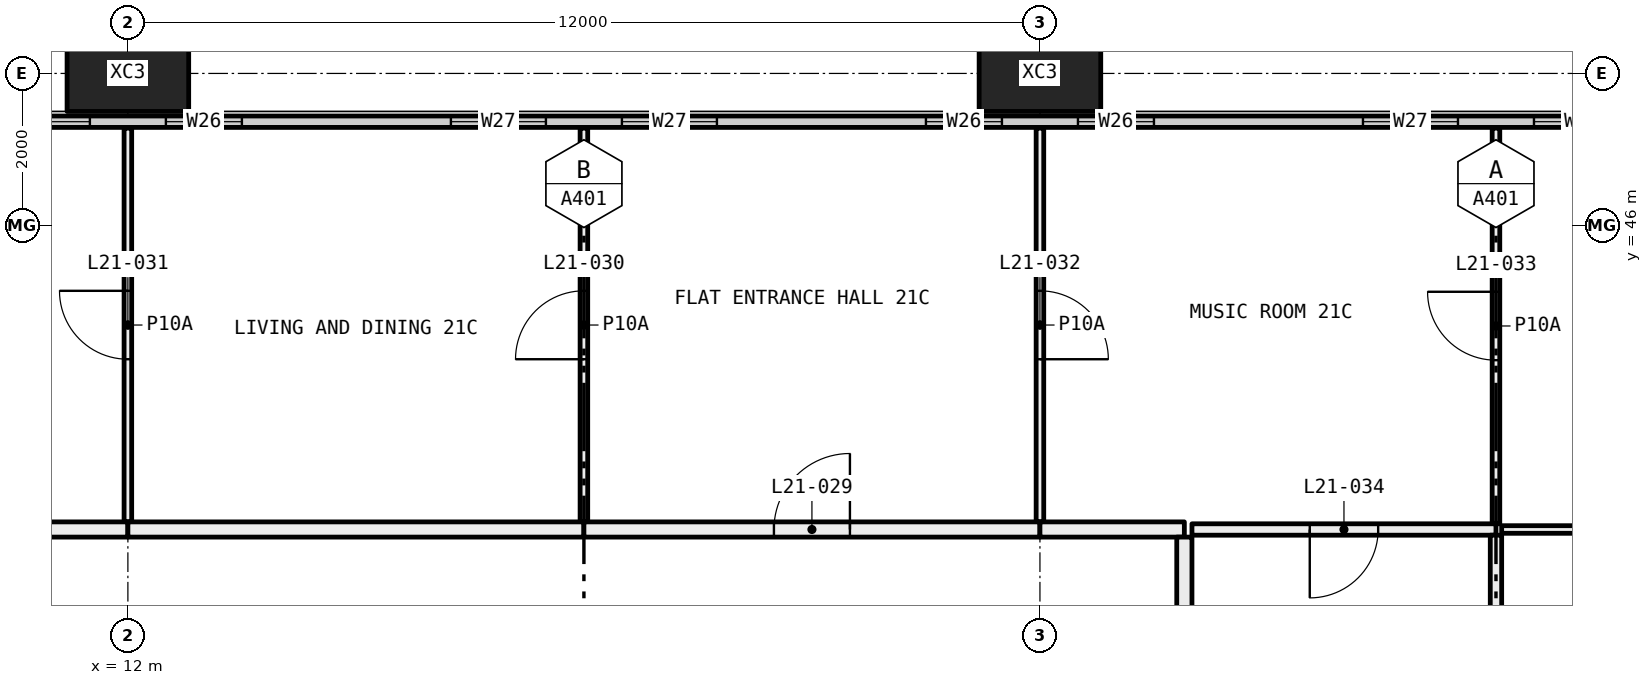
"""IFC4 building model, lengths in metres.
Left out: names, types, materials, properties, quantities, classifications, styles, units other than length and angle.
Written with IfcOpenShell. Run it as: python <this file> out.ifc"""

import sys

from ifc_helpers import new_model, si_unit, direction, frame, frame_2d, origin, origin_2d, place, context, subcontext, project, spatial, rectangle, hollow_rectangle, extrude, element, fill, save


model = new_model("IFC4")
c1 = context("Model", 3, precision=1e-05, world=origin(), true_north=direction((0.0, 1.0)))
c2 = subcontext(c1, "Body", "Model", "MODEL_VIEW")
j1 = project(units=[si_unit("LENGTHUNIT", "METRE"), si_unit("PLANEANGLEUNIT", "RADIAN")], contexts=[c1])
p1 = place(None, origin())
s1 = spatial("IfcSite", under=j1, at=p1, CompositionType="ELEMENT")
p2 = place(p1, origin())
s2 = spatial("IfcBuilding", under=s1, at=p2, CompositionType="ELEMENT")
p3 = place(p2, frame((0.0, 0.0, 85.2)))
s3 = spatial("IfcBuildingStorey", under=s2, at=p3, CompositionType="ELEMENT", Elevation=85.2)
for number, where, z_axis, x_axis in (
    (1, (12.0, 48.0, -0.4), (0.0, 0.0, 1.0), (1.0, 0.0, 0.0)),
    (2, (24.0, 48.0, -0.4), (0.0, 0.0, 1.0), (1.0, 0.0, 0.0)),
):
    element("IfcColumn", number, at=place(p3, frame(where, z_axis=z_axis, x_axis=x_axis)), inside=s3, PredefinedType="COLUMN", context=c2, shape_type="SweptSolid", body=[
        extrude(hollow_rectangle(XDim=1.6, YDim=1.0, WallThickness=0.065, at=origin_2d()), origin(), (0.0, 0.0, 1.0), 3.45),
    ])
p4 = place(p3, frame((6.56, 47.365, 0.0), z_axis=(0.0, 0.0, 1.0), x_axis=(1.0, 0.0, 0.0)))
e3 = element("IfcWall", 3, at=p4, inside=s3, PredefinedType="ELEMENTEDWALL", context=c2, shape_type="SweptSolid", body=[
    extrude(rectangle(XDim=58.88, YDim=0.15, at=frame_2d((29.44, 0.0))), origin(), (0.0, 0.0, 1.0), 3.05),
])
p5 = place(p4, frame((0.44, 0.0, 0.45)))
e4 = element("IfcOpeningElement", 4, at=p5, cuts=e3, PredefinedType="OPENING", context=c2, shape_type="SweptSolid", body=[
    extrude(rectangle(XDim=4.5, YDim=2.55, at=frame_2d((2.25, 1.275))), frame((0.0, 0.085, 0.0), z_axis=(0.0, -1.0, 0.0), x_axis=(1.0, 0.0, 0.0)), (0.0, 0.0, 1.0), 0.17),
])
p6 = place(p4, frame((5.94, 0.0, 0.45)))
e5 = element("IfcOpeningElement", 5, at=p6, cuts=e3, PredefinedType="OPENING", context=c2, shape_type="SweptSolid", body=[
    extrude(rectangle(XDim=1.0, YDim=2.55, at=frame_2d((0.5, 1.275))), frame((0.0, 0.085, 0.0), z_axis=(0.0, -1.0, 0.0), x_axis=(1.0, 0.0, 0.0)), (0.0, 0.0, 1.0), 0.17),
])
p7 = place(p4, frame((9.69, 0.0, 0.45)))
e6 = element("IfcOpeningElement", 6, at=p7, cuts=e3, PredefinedType="OPENING", context=c2, shape_type="SweptSolid", body=[
    extrude(rectangle(XDim=1.25, YDim=2.55, at=frame_2d((0.625, 1.275))), frame((0.0, 0.085, 0.0), z_axis=(0.0, -1.0, 0.0), x_axis=(1.0, 0.0, 0.0)), (0.0, 0.0, 1.0), 0.17),
])
p8 = place(p4, frame((11.94, 0.0, 0.45)))
e7 = element("IfcOpeningElement", 7, at=p8, cuts=e3, PredefinedType="OPENING", context=c2, shape_type="SweptSolid", body=[
    extrude(rectangle(XDim=1.25, YDim=2.55, at=frame_2d((0.625, 1.275))), frame((0.0, 0.085, 0.0), z_axis=(0.0, -1.0, 0.0), x_axis=(1.0, 0.0, 0.0)), (0.0, 0.0, 1.0), 0.17),
])
p9 = place(p4, frame((15.94, 0.0, 0.45)))
e8 = element("IfcOpeningElement", 8, at=p9, cuts=e3, PredefinedType="OPENING", context=c2, shape_type="SweptSolid", body=[
    extrude(rectangle(XDim=1.0, YDim=2.55, at=frame_2d((0.5, 1.275))), frame((0.0, 0.085, 0.0), z_axis=(0.0, -1.0, 0.0), x_axis=(1.0, 0.0, 0.0)), (0.0, 0.0, 1.0), 0.17),
])
p10 = place(p4, frame((17.94, 0.0, 0.45)))
e9 = element("IfcOpeningElement", 9, at=p10, cuts=e3, PredefinedType="OPENING", context=c2, shape_type="SweptSolid", body=[
    extrude(rectangle(XDim=1.0, YDim=2.55, at=frame_2d((0.5, 1.275))), frame((0.0, 0.085, 0.0), z_axis=(0.0, -1.0, 0.0), x_axis=(1.0, 0.0, 0.0)), (0.0, 0.0, 1.0), 0.17),
])
p11 = place(p4, frame((21.69, 0.0, 0.45)))
e10 = element("IfcOpeningElement", 10, at=p11, cuts=e3, PredefinedType="OPENING", context=c2, shape_type="SweptSolid", body=[
    extrude(rectangle(XDim=1.25, YDim=2.55, at=frame_2d((0.625, 1.275))), frame((0.0, 0.085, 0.0), z_axis=(0.0, -1.0, 0.0), x_axis=(1.0, 0.0, 0.0)), (0.0, 0.0, 1.0), 0.17),
])
p12 = place(p4, frame((23.94, 0.0, 0.45)))
e11 = element("IfcOpeningElement", 11, at=p12, cuts=e3, PredefinedType="OPENING", context=c2, shape_type="SweptSolid", body=[
    extrude(rectangle(XDim=1.25, YDim=2.55, at=frame_2d((0.625, 1.275))), frame((0.0, 0.085, 0.0), z_axis=(0.0, -1.0, 0.0), x_axis=(1.0, 0.0, 0.0)), (0.0, 0.0, 1.0), 0.17),
])
p13 = place(p4, frame((27.94, 0.0, 0.45)))
e12 = element("IfcOpeningElement", 12, at=p13, cuts=e3, PredefinedType="OPENING", context=c2, shape_type="SweptSolid", body=[
    extrude(rectangle(XDim=1.0, YDim=2.55, at=frame_2d((0.5, 1.275))), frame((0.0, 0.085, 0.0), z_axis=(0.0, -1.0, 0.0), x_axis=(1.0, 0.0, 0.0)), (0.0, 0.0, 1.0), 0.17),
])
p14 = place(p4, frame((29.94, 0.0, 0.45)))
e13 = element("IfcOpeningElement", 13, at=p14, cuts=e3, PredefinedType="OPENING", context=c2, shape_type="SweptSolid", body=[
    extrude(rectangle(XDim=1.0, YDim=2.55, at=frame_2d((0.5, 1.275))), frame((0.0, 0.085, 0.0), z_axis=(0.0, -1.0, 0.0), x_axis=(1.0, 0.0, 0.0)), (0.0, 0.0, 1.0), 0.17),
])
p15 = place(p4, frame((33.69, 0.0, 0.45)))
e14 = element("IfcOpeningElement", 14, at=p15, cuts=e3, PredefinedType="OPENING", context=c2, shape_type="SweptSolid", body=[
    extrude(rectangle(XDim=1.25, YDim=2.55, at=frame_2d((0.625, 1.275))), frame((0.0, 0.085, 0.0), z_axis=(0.0, -1.0, 0.0), x_axis=(1.0, 0.0, 0.0)), (0.0, 0.0, 1.0), 0.17),
])
p16 = place(p4, frame((35.94, 0.0, 0.45)))
e15 = element("IfcOpeningElement", 15, at=p16, cuts=e3, PredefinedType="OPENING", context=c2, shape_type="SweptSolid", body=[
    extrude(rectangle(XDim=1.25, YDim=2.55, at=frame_2d((0.625, 1.275))), frame((0.0, 0.085, 0.0), z_axis=(0.0, -1.0, 0.0), x_axis=(1.0, 0.0, 0.0)), (0.0, 0.0, 1.0), 0.17),
])
p17 = place(p4, frame((39.94, 0.0, 0.45)))
e16 = element("IfcOpeningElement", 16, at=p17, cuts=e3, PredefinedType="OPENING", context=c2, shape_type="SweptSolid", body=[
    extrude(rectangle(XDim=1.0, YDim=2.55, at=frame_2d((0.5, 1.275))), frame((0.0, 0.085, 0.0), z_axis=(0.0, -1.0, 0.0), x_axis=(1.0, 0.0, 0.0)), (0.0, 0.0, 1.0), 0.17),
])
p18 = place(p4, frame((41.94, 0.0, 0.45)))
e17 = element("IfcOpeningElement", 17, at=p18, cuts=e3, PredefinedType="OPENING", context=c2, shape_type="SweptSolid", body=[
    extrude(rectangle(XDim=1.0, YDim=2.55, at=frame_2d((0.5, 1.275))), frame((0.0, 0.085, 0.0), z_axis=(0.0, -1.0, 0.0), x_axis=(1.0, 0.0, 0.0)), (0.0, 0.0, 1.0), 0.17),
])
p19 = place(p4, frame((45.69, 0.0, 0.45)))
e18 = element("IfcOpeningElement", 18, at=p19, cuts=e3, PredefinedType="OPENING", context=c2, shape_type="SweptSolid", body=[
    extrude(rectangle(XDim=1.25, YDim=2.55, at=frame_2d((0.625, 1.275))), frame((0.0, 0.085, 0.0), z_axis=(0.0, -1.0, 0.0), x_axis=(1.0, 0.0, 0.0)), (0.0, 0.0, 1.0), 0.17),
])
p20 = place(p4, frame((47.94, 0.0, 0.45)))
e19 = element("IfcOpeningElement", 19, at=p20, cuts=e3, PredefinedType="OPENING", context=c2, shape_type="SweptSolid", body=[
    extrude(rectangle(XDim=1.25, YDim=2.55, at=frame_2d((0.625, 1.275))), frame((0.0, 0.085, 0.0), z_axis=(0.0, -1.0, 0.0), x_axis=(1.0, 0.0, 0.0)), (0.0, 0.0, 1.0), 0.17),
])
p21 = place(p4, frame((51.94, 0.0, 0.45)))
e20 = element("IfcOpeningElement", 20, at=p21, cuts=e3, PredefinedType="OPENING", context=c2, shape_type="SweptSolid", body=[
    extrude(rectangle(XDim=1.0, YDim=2.55, at=frame_2d((0.5, 1.275))), frame((0.0, 0.085, 0.0), z_axis=(0.0, -1.0, 0.0), x_axis=(1.0, 0.0, 0.0)), (0.0, 0.0, 1.0), 0.17),
])
p22 = place(p4, frame((53.94, 0.0, 0.45)))
e21 = element("IfcOpeningElement", 21, at=p22, cuts=e3, PredefinedType="OPENING", context=c2, shape_type="SweptSolid", body=[
    extrude(rectangle(XDim=4.5, YDim=2.55, at=frame_2d((2.25, 1.275))), frame((0.0, 0.085, 0.0), z_axis=(0.0, -1.0, 0.0), x_axis=(1.0, 0.0, 0.0)), (0.0, 0.0, 1.0), 0.17),
])
p23 = place(p3, frame((12.0, 42.1, 0.0), z_axis=(0.0, 0.0, 1.0), x_axis=(0.0, 1.0, 0.0)))
e22 = element("IfcWall", 22, at=p23, inside=s3, PredefinedType="PARTITIONING", context=c2, shape_type="SweptSolid", body=[
    extrude(rectangle(XDim=5.18, YDim=0.1, at=frame_2d((2.59, 0.0))), origin(), (0.0, 0.0, 1.0), 3.05),
])
p24 = place(p23, frame((2.14, 0.0, 0.0)))
e23 = element("IfcOpeningElement", 23, at=p24, cuts=e22, PredefinedType="OPENING", context=c2, shape_type="SweptSolid", body=[
    extrude(rectangle(XDim=0.9, YDim=2.1, at=frame_2d((0.45, 1.05))), frame((0.0, 0.06, 0.0), z_axis=(0.0, -1.0, 0.0), x_axis=(1.0, 0.0, 0.0)), (0.0, 0.0, 1.0), 0.12),
])
p25 = place(p3, frame((10.2, 42.0, 0.0), z_axis=(0.0, 0.0, 1.0), x_axis=(1.0, 0.0, 0.0)))
e24 = element("IfcWall", 24, at=p25, inside=s3, PredefinedType="PARTITIONING", context=c2, shape_type="SweptSolid", body=[
    extrude(rectangle(XDim=1.8, YDim=0.2, at=frame_2d((0.9, 0.0))), origin(), (0.0, 0.0, 1.0), 3.05),
])
p26 = place(p3, frame((18.0, 42.1, 0.0), z_axis=(0.0, 0.0, 1.0), x_axis=(0.0, 1.0, 0.0)))
e25 = element("IfcWall", 25, at=p26, inside=s3, PredefinedType="PARTITIONING", context=c2, shape_type="SweptSolid", body=[
    extrude(rectangle(XDim=5.18, YDim=0.1, at=frame_2d((2.59, 0.0))), origin(), (0.0, 0.0, 1.0), 3.05),
])
p27 = place(p26, frame((2.14, 0.0, 0.0)))
e26 = element("IfcOpeningElement", 26, at=p27, cuts=e25, PredefinedType="OPENING", context=c2, shape_type="SweptSolid", body=[
    extrude(rectangle(XDim=0.9, YDim=2.1, at=frame_2d((0.45, 1.05))), frame((0.0, 0.06, 0.0), z_axis=(0.0, -1.0, 0.0), x_axis=(1.0, 0.0, 0.0)), (0.0, 0.0, 1.0), 0.12),
])
p28 = place(p3, frame((12.0, 42.0, 0.0), z_axis=(0.0, 0.0, 1.0), x_axis=(1.0, 0.0, 0.0)))
e27 = element("IfcWall", 27, at=p28, inside=s3, PredefinedType="PARTITIONING", context=c2, shape_type="SweptSolid", body=[
    extrude(rectangle(XDim=6.0, YDim=0.2, at=frame_2d((3.0, 0.0))), origin(), (0.0, 0.0, 1.0), 3.05),
])
p29 = place(p3, frame((24.0, 42.1, 0.0), z_axis=(0.0, 0.0, 1.0), x_axis=(0.0, 1.0, 0.0)))
e28 = element("IfcWall", 28, at=p29, inside=s3, PredefinedType="PARTITIONING", context=c2, shape_type="SweptSolid", body=[
    extrude(rectangle(XDim=5.18, YDim=0.1, at=frame_2d((2.59, 0.0))), origin(), (0.0, 0.0, 1.0), 3.05),
])
p30 = place(p29, frame((2.14, 0.0, 0.0)))
e29 = element("IfcOpeningElement", 29, at=p30, cuts=e28, PredefinedType="OPENING", context=c2, shape_type="SweptSolid", body=[
    extrude(rectangle(XDim=0.9, YDim=2.1, at=frame_2d((0.45, 1.05))), frame((0.0, 0.06, 0.0), z_axis=(0.0, -1.0, 0.0), x_axis=(1.0, 0.0, 0.0)), (0.0, 0.0, 1.0), 0.12),
])
p31 = place(p3, frame((18.0, 42.0, 0.0), z_axis=(0.0, 0.0, 1.0), x_axis=(1.0, 0.0, 0.0)))
e30 = element("IfcWall", 30, at=p31, inside=s3, PredefinedType="PARTITIONING", context=c2, shape_type="SweptSolid", body=[
    extrude(rectangle(XDim=6.0, YDim=0.2, at=frame_2d((3.0, 0.0))), origin(), (0.0, 0.0, 1.0), 3.05),
])
p32 = place(p31, frame((2.5, 0.0, 0.0)))
e31 = element("IfcOpeningElement", 31, at=p32, cuts=e30, PredefinedType="OPENING", context=c2, shape_type="SweptSolid", body=[
    extrude(rectangle(XDim=1.0, YDim=2.1, at=frame_2d((0.5, 1.05))), frame((0.0, 0.11, 0.0), z_axis=(0.0, -1.0, 0.0), x_axis=(1.0, 0.0, 0.0)), (0.0, 0.0, 1.0), 0.22),
])
p33 = place(p3, frame((30.0, 42.075, 0.0), z_axis=(0.0, 0.0, 1.0), x_axis=(0.0, 1.0, 0.0)))
e32 = element("IfcWall", 32, at=p33, inside=s3, PredefinedType="PARTITIONING", context=c2, shape_type="SweptSolid", body=[
    extrude(rectangle(XDim=5.205, YDim=0.1, at=frame_2d((2.603, 0.0))), origin(), (0.0, 0.0, 1.0), 3.05),
])
p34 = place(p33, frame((2.153, 0.0, 0.0)))
e33 = element("IfcOpeningElement", 33, at=p34, cuts=e32, PredefinedType="OPENING", context=c2, shape_type="SweptSolid", body=[
    extrude(rectangle(XDim=0.9, YDim=2.1, at=frame_2d((0.45, 1.05))), frame((0.0, 0.06, 0.0), z_axis=(0.0, -1.0, 0.0), x_axis=(1.0, 0.0, 0.0)), (0.0, 0.0, 1.0), 0.12),
])
p35 = place(p3, frame((26.0, 42.0, 0.0), z_axis=(0.0, 0.0, 1.0), x_axis=(1.0, 0.0, 0.0)))
e34 = element("IfcWall", 34, at=p35, inside=s3, PredefinedType="PARTITIONING", context=c2, shape_type="SweptSolid", body=[
    extrude(rectangle(XDim=4.0, YDim=0.15, at=frame_2d((2.0, 0.0))), origin(), (0.0, 0.0, 1.0), 3.05),
])
p36 = place(p35, frame((1.55, 0.0, 0.0)))
e35 = element("IfcOpeningElement", 35, at=p36, cuts=e34, PredefinedType="OPENING", context=c2, shape_type="SweptSolid", body=[
    extrude(rectangle(XDim=0.9, YDim=2.1, at=frame_2d((0.45, 1.05))), frame((0.0, 0.085, 0.0), z_axis=(0.0, -1.0, 0.0), x_axis=(1.0, 0.0, 0.0)), (0.0, 0.0, 1.0), 0.17),
])
p37 = place(p3, frame((24.0, 42.0, 0.0), z_axis=(0.0, 0.0, 1.0), x_axis=(1.0, 0.0, 0.0)))
e36 = element("IfcWall", 36, at=p37, inside=s3, PredefinedType="PARTITIONING", context=c2, shape_type="SweptSolid", body=[
    extrude(rectangle(XDim=1.9, YDim=0.2, at=frame_2d((0.95, 0.0))), origin(), (0.0, 0.0, 1.0), 3.05),
])
p38 = place(p3, frame((30.075, 42.0, 0.0), z_axis=(0.0, 0.0, 1.0), x_axis=(1.0, 0.0, 0.0)))
e37 = element("IfcWall", 37, at=p38, inside=s3, PredefinedType="PARTITIONING", context=c2, shape_type="SweptSolid", body=[
    extrude(rectangle(XDim=4.425, YDim=0.1, at=frame_2d((2.212, 0.0))), origin(), (0.0, 0.0, 1.0), 3.05),
])
p39 = place(p38, frame((1.762, 0.0, 0.0)))
e38 = element("IfcOpeningElement", 38, at=p39, cuts=e37, PredefinedType="OPENING", context=c2, shape_type="SweptSolid", body=[
    extrude(rectangle(XDim=0.9, YDim=2.1, at=frame_2d((0.45, 1.05))), frame((0.0, 0.06, 0.0), z_axis=(0.0, -1.0, 0.0), x_axis=(1.0, 0.0, 0.0)), (0.0, 0.0, 1.0), 0.12),
])
p40 = place(p3, frame((30.0, 38.175, 0.0), z_axis=(0.0, 0.0, 1.0), x_axis=(0.0, 1.0, 0.0)))
e39 = element("IfcWall", 39, at=p40, inside=s3, PredefinedType="PARTITIONING", context=c2, shape_type="SweptSolid", body=[
    extrude(rectangle(XDim=3.75, YDim=0.15, at=frame_2d((1.875, 0.0))), origin(), (0.0, 0.0, 1.0), 3.05),
])
p41 = place(p3, frame((25.9, 41.9, 0.0), z_axis=(0.0, 0.0, 1.0), x_axis=(0.0, -1.0, 0.0)))
e40 = element("IfcWall", 40, at=p41, inside=s3, PredefinedType="PARTITIONING", context=c2, shape_type="SweptSolid", body=[
    extrude(rectangle(XDim=3.8, YDim=0.2, at=frame_2d((1.9, 0.0))), origin(), (0.0, 0.0, 1.0), 3.05),
])
p42 = place(p5, origin())
e41 = element("IfcWindow", 41, at=p42, inside=s3, PartitioningType="SINGLE_PANEL", PredefinedType="WINDOW", context=c2, shape_type="SweptSolid", body=[
    extrude(rectangle(XDim=4.5, YDim=2.55, at=frame_2d((2.25, 1.275))), frame((0.0, 0.03, 0.0), z_axis=(0.0, -1.0, 0.0), x_axis=(1.0, 0.0, 0.0)), (0.0, 0.0, 1.0), 0.06),
])
fill(e4, e41)
p43 = place(p6, origin())
e42 = element("IfcWindow", 42, at=p43, inside=s3, PartitioningType="SINGLE_PANEL", PredefinedType="WINDOW", context=c2, shape_type="SweptSolid", body=[
    extrude(rectangle(XDim=1.0, YDim=2.55, at=frame_2d((0.5, 1.275))), frame((0.0, 0.03, 0.0), z_axis=(0.0, -1.0, 0.0), x_axis=(1.0, 0.0, 0.0)), (0.0, 0.0, 1.0), 0.06),
])
fill(e5, e42)
p44 = place(p7, origin())
e43 = element("IfcWindow", 43, at=p44, inside=s3, PartitioningType="SINGLE_PANEL", PredefinedType="WINDOW", context=c2, shape_type="SweptSolid", body=[
    extrude(rectangle(XDim=1.25, YDim=2.55, at=frame_2d((0.625, 1.275))), frame((0.0, 0.03, 0.0), z_axis=(0.0, -1.0, 0.0), x_axis=(1.0, 0.0, 0.0)), (0.0, 0.0, 1.0), 0.06),
])
fill(e6, e43)
p45 = place(p8, origin())
e44 = element("IfcWindow", 44, at=p45, inside=s3, PartitioningType="SINGLE_PANEL", PredefinedType="WINDOW", context=c2, shape_type="SweptSolid", body=[
    extrude(rectangle(XDim=1.25, YDim=2.55, at=frame_2d((0.625, 1.275))), frame((0.0, 0.03, 0.0), z_axis=(0.0, -1.0, 0.0), x_axis=(1.0, 0.0, 0.0)), (0.0, 0.0, 1.0), 0.06),
])
fill(e7, e44)
p46 = place(p9, origin())
e45 = element("IfcWindow", 45, at=p46, inside=s3, PartitioningType="SINGLE_PANEL", PredefinedType="WINDOW", context=c2, shape_type="SweptSolid", body=[
    extrude(rectangle(XDim=1.0, YDim=2.55, at=frame_2d((0.5, 1.275))), frame((0.0, 0.03, 0.0), z_axis=(0.0, -1.0, 0.0), x_axis=(1.0, 0.0, 0.0)), (0.0, 0.0, 1.0), 0.06),
])
fill(e8, e45)
p47 = place(p10, origin())
e46 = element("IfcWindow", 46, at=p47, inside=s3, PartitioningType="SINGLE_PANEL", PredefinedType="WINDOW", context=c2, shape_type="SweptSolid", body=[
    extrude(rectangle(XDim=1.0, YDim=2.55, at=frame_2d((0.5, 1.275))), frame((0.0, 0.03, 0.0), z_axis=(0.0, -1.0, 0.0), x_axis=(1.0, 0.0, 0.0)), (0.0, 0.0, 1.0), 0.06),
])
fill(e9, e46)
p48 = place(p11, origin())
e47 = element("IfcWindow", 47, at=p48, inside=s3, PartitioningType="SINGLE_PANEL", PredefinedType="WINDOW", context=c2, shape_type="SweptSolid", body=[
    extrude(rectangle(XDim=1.25, YDim=2.55, at=frame_2d((0.625, 1.275))), frame((0.0, 0.03, 0.0), z_axis=(0.0, -1.0, 0.0), x_axis=(1.0, 0.0, 0.0)), (0.0, 0.0, 1.0), 0.06),
])
fill(e10, e47)
p49 = place(p12, origin())
e48 = element("IfcWindow", 48, at=p49, inside=s3, PartitioningType="SINGLE_PANEL", PredefinedType="WINDOW", context=c2, shape_type="SweptSolid", body=[
    extrude(rectangle(XDim=1.25, YDim=2.55, at=frame_2d((0.625, 1.275))), frame((0.0, 0.03, 0.0), z_axis=(0.0, -1.0, 0.0), x_axis=(1.0, 0.0, 0.0)), (0.0, 0.0, 1.0), 0.06),
])
fill(e11, e48)
p50 = place(p32, origin())
e49 = element("IfcDoor", 49, at=p50, inside=s3, OperationType="SINGLE_SWING_LEFT", PredefinedType="DOOR", context=c2, shape_type="SweptSolid", body=[
    extrude(rectangle(XDim=1.0, YDim=2.1, at=frame_2d((0.5, 1.05))), frame((0.0, 0.025, 0.0), z_axis=(0.0, -1.0, 0.0), x_axis=(1.0, 0.0, 0.0)), (0.0, 0.0, 1.0), 0.05),
])
fill(e31, e49)
p51 = place(p27, origin())
e50 = element("IfcDoor", 50, at=p51, inside=s3, OperationType="SINGLE_SWING_RIGHT", PredefinedType="DOOR", context=c2, shape_type="SweptSolid", body=[
    extrude(rectangle(XDim=0.9, YDim=2.1, at=frame_2d((0.45, 1.05))), frame((0.0, 0.025, 0.0), z_axis=(0.0, -1.0, 0.0), x_axis=(1.0, 0.0, 0.0)), (0.0, 0.0, 1.0), 0.05),
])
fill(e26, e50)
p52 = place(p24, origin())
e51 = element("IfcDoor", 51, at=p52, inside=s3, OperationType="SINGLE_SWING_LEFT", PredefinedType="DOOR", context=c2, shape_type="SweptSolid", body=[
    extrude(rectangle(XDim=0.9, YDim=2.1, at=frame_2d((0.45, 1.05))), frame((0.0, 0.025, 0.0), z_axis=(0.0, -1.0, 0.0), x_axis=(1.0, 0.0, 0.0)), (0.0, 0.0, 1.0), 0.05),
])
fill(e23, e51)
p53 = place(p30, frame((0.9, 0.0, 0.0), x_axis=(-1.0, 0.0, 0.0)))
e52 = element("IfcDoor", 52, at=p53, inside=s3, OperationType="SINGLE_SWING_LEFT", PredefinedType="DOOR", context=c2, shape_type="SweptSolid", body=[
    extrude(rectangle(XDim=0.9, YDim=2.1, at=frame_2d((0.45, 1.05))), frame((0.0, 0.025, 0.0), z_axis=(0.0, -1.0, 0.0), x_axis=(1.0, 0.0, 0.0)), (0.0, 0.0, 1.0), 0.05),
])
fill(e29, e52)
p54 = place(p34, origin())
e53 = element("IfcDoor", 53, at=p54, inside=s3, OperationType="SINGLE_SWING_LEFT", PredefinedType="DOOR", context=c2, shape_type="SweptSolid", body=[
    extrude(rectangle(XDim=0.9, YDim=2.1, at=frame_2d((0.45, 1.05))), frame((0.0, 0.025, 0.0), z_axis=(0.0, -1.0, 0.0), x_axis=(1.0, 0.0, 0.0)), (0.0, 0.0, 1.0), 0.05),
])
fill(e33, e53)
p55 = place(p36, frame((0.9, 0.0, 0.0), x_axis=(-1.0, 0.0, 0.0)))
e54 = element("IfcDoor", 54, at=p55, inside=s3, OperationType="SINGLE_SWING_LEFT", PredefinedType="DOOR", context=c2, shape_type="SweptSolid", body=[
    extrude(rectangle(XDim=0.9, YDim=2.1, at=frame_2d((0.45, 1.05))), frame((0.0, 0.025, 0.0), z_axis=(0.0, -1.0, 0.0), x_axis=(1.0, 0.0, 0.0)), (0.0, 0.0, 1.0), 0.05),
])
fill(e35, e54)
save(model, sys.argv[1])
